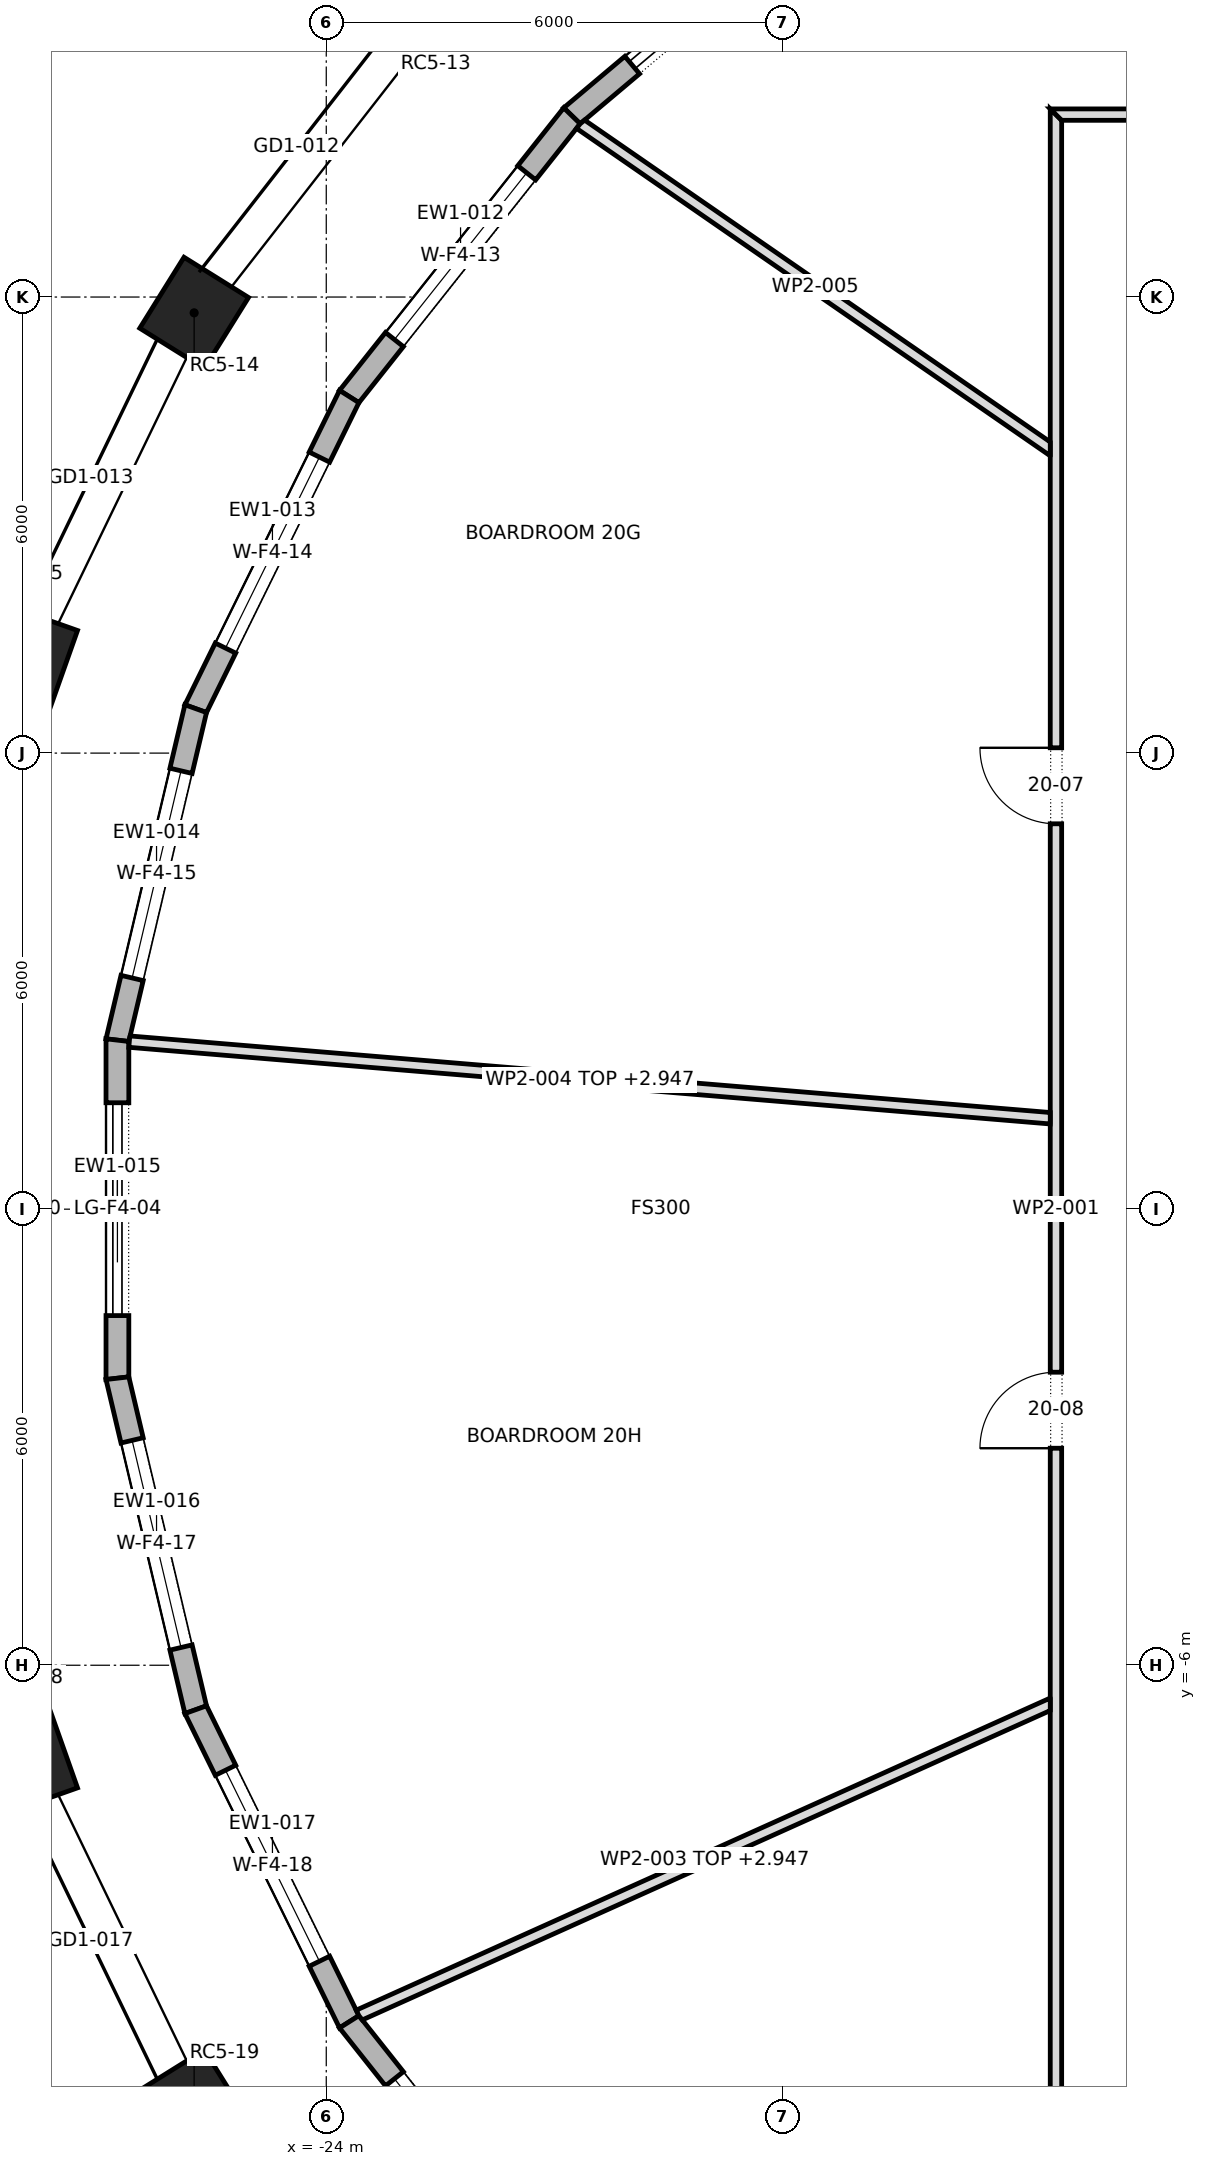
"""IFC4 building model, lengths in metres.
Left out: names, types, materials, properties, quantities, classifications, styles, units other than length and angle.
Written with IfcOpenShell. Run it as: python <this file> out.ifc"""

import sys

from ifc_helpers import new_model, si_unit, direction, frame, frame_2d, origin, origin_2d, place, context, subcontext, project, spatial, polyline, rectangle, outline, extrude, element, fill, save


model = new_model("IFC4")
c1 = context("Model", 3, precision=1e-05, world=origin(), true_north=direction((0.0, 1.0)))
c2 = subcontext(c1, "Body", "Model", "MODEL_VIEW")
j1 = project(units=[si_unit("LENGTHUNIT", "METRE"), si_unit("PLANEANGLEUNIT", "RADIAN")], contexts=[c1])
p1 = place(None, origin())
s1 = spatial("IfcSite", under=j1, at=p1, CompositionType="ELEMENT")
p2 = place(p1, origin())
s2 = spatial("IfcBuilding", under=s1, at=p2, CompositionType="ELEMENT")
p3 = place(p2, frame((0.0, 0.0, 288.3)))
s3 = spatial("IfcBuildingStorey", under=s2, at=p3, CompositionType="ELEMENT", Elevation=288.3)
for number, where, z_axis, x_axis in (
    (1, (-22.56, 15.869, 0.0), (0.0, 0.0, 1.0), (-0.692, -0.722, 0.0)),
    (2, (-25.738, 11.792, 0.0), (0.0, 0.0, 1.0), (-0.529, -0.849, 0.0)),
    (3, (-27.927, 7.261, 0.0), (0.0, 0.0, 1.0), (-0.334, -0.943, 0.0)),
    (4, (-27.927, -7.261, 0.0), (0.0, 0.0, 1.0), (0.334, -0.943, 0.0)),
    (5, (-25.738, -11.792, 0.0), (0.0, 0.0, 1.0), (0.529, -0.849, 0.0)),
):
    element("IfcColumn", number, at=place(p3, frame(where, z_axis=z_axis, x_axis=x_axis)), inside=s3, PredefinedType="COLUMN", context=c2, shape_type="SweptSolid", body=[
        extrude(rectangle(XDim=1.1, YDim=1.0, at=origin_2d()), origin(), (0.0, 0.0, 1.0), 4.0),
    ])
p4 = place(p3, frame((-17.041, 17.523, 0.0), z_axis=(0.0, 0.0, 1.0), x_axis=(-0.764876116592, -0.644177402792, 0.0)))
e6 = element("IfcWall", 6, at=p4, inside=s3, PredefinedType="STANDARD", context=c2, shape_type="SweptSolid", body=[
    extrude(outline(polyline([(-0.014, -0.15), (4.888, -0.15), (4.858, 0.15), (0.014, 0.15), (-0.014, -0.15)])), origin(), (0.0, 0.0, 1.0), 3.7),
])
p5 = place(p4, frame((1.036, 0.0, 0.0)))
e7 = element("IfcOpeningElement", 7, at=p5, cuts=e6, PredefinedType="OPENING", context=c2, shape_type="SweptSolid", body=[
    extrude(rectangle(XDim=2.8, YDim=3.25, at=frame_2d((1.4, 1.625))), frame((0.0, 0.162, 0.0), z_axis=(0.0, -1.0, 0.0), x_axis=(1.0, 0.0, 0.0)), (0.0, 0.0, 1.0), 0.324),
])
p6 = place(p3, frame((-20.768, 14.384, 0.0), z_axis=(0.0, 0.0, 1.0), x_axis=(-0.621544881236, -0.783378555112, 0.0)))
e8 = element("IfcWall", 8, at=p6, inside=s3, PredefinedType="STANDARD", context=c2, shape_type="SweptSolid", body=[
    extrude(outline(polyline([(-0.015, -0.15), (4.73, -0.15), (4.698, 0.15), (0.015, 0.15), (-0.015, -0.15)])), origin(), (0.0, 0.0, 1.0), 3.7),
])
p7 = place(p6, frame((0.957, 0.0, 0.6)))
e9 = element("IfcOpeningElement", 9, at=p7, cuts=e8, PredefinedType="OPENING", context=c2, shape_type="SweptSolid", body=[
    extrude(rectangle(XDim=2.8, YDim=2.65, at=frame_2d((1.4, 1.325))), frame((0.0, 0.162, 0.0), z_axis=(0.0, -1.0, 0.0), x_axis=(1.0, 0.0, 0.0)), (0.0, 0.0, 1.0), 0.324),
])
p8 = place(p3, frame((-23.698, 10.691, 0.0), z_axis=(0.0, 0.0, 1.0), x_axis=(-0.441335149795, -0.897342345794, 0.0)))
e10 = element("IfcWall", 10, at=p8, inside=s3, PredefinedType="STANDARD", context=c2, shape_type="SweptSolid", body=[
    extrude(outline(polyline([(-0.016, -0.15), (4.593, -0.15), (4.559, 0.15), (0.016, 0.15), (-0.016, -0.15)])), origin(), (0.0, 0.0, 1.0), 3.7),
])
p9 = place(p8, frame((0.888, 0.0, 0.6)))
e11 = element("IfcOpeningElement", 11, at=p9, cuts=e10, PredefinedType="OPENING", context=c2, shape_type="SweptSolid", body=[
    extrude(rectangle(XDim=2.8, YDim=2.65, at=frame_2d((1.4, 1.325))), frame((0.0, 0.162, 0.0), z_axis=(0.0, -1.0, 0.0), x_axis=(1.0, 0.0, 0.0)), (0.0, 0.0, 1.0), 0.324),
])
p10 = place(p3, frame((-25.718, 6.585, 0.0), z_axis=(0.0, 0.0, 1.0), x_axis=(-0.229862207503, -0.973223183839, 0.0)))
e12 = element("IfcWall", 12, at=p10, inside=s3, PredefinedType="STANDARD", context=c2, shape_type="SweptSolid", body=[
    extrude(outline(polyline([(-0.017, -0.15), (4.499, -0.15), (4.463, 0.15), (0.017, 0.15), (-0.017, -0.15)])), origin(), (0.0, 0.0, 1.0), 3.7),
])
p11 = place(p10, frame((0.841, 0.0, 0.6)))
e13 = element("IfcOpeningElement", 13, at=p11, cuts=e12, PredefinedType="OPENING", context=c2, shape_type="SweptSolid", body=[
    extrude(rectangle(XDim=2.8, YDim=2.65, at=frame_2d((1.4, 1.325))), frame((0.0, 0.162, 0.0), z_axis=(0.0, -1.0, 0.0), x_axis=(1.0, 0.0, 0.0)), (0.0, 0.0, 1.0), 0.324),
])
p12 = place(p3, frame((-26.748, 2.224, 0.0), z_axis=(0.0, 0.0, 1.0), x_axis=(0.0, -1.0, 0.0)))
e14 = element("IfcWall", 14, at=p12, inside=s3, PredefinedType="STANDARD", context=c2, shape_type="SweptSolid", body=[
    extrude(outline(polyline([(-0.018, -0.15), (4.465, -0.15), (4.43, 0.15), (0.018, 0.15), (-0.018, -0.15)])), origin(), (0.0, 0.0, 1.0), 3.7),
])
p13 = place(p12, frame((0.824, 0.0, 0.0)))
e15 = element("IfcOpeningElement", 15, at=p13, cuts=e14, PredefinedType="OPENING", context=c2, shape_type="SweptSolid", body=[
    extrude(rectangle(XDim=2.8, YDim=3.25, at=frame_2d((1.4, 1.625))), frame((0.0, 0.162, 0.0), z_axis=(0.0, -1.0, 0.0), x_axis=(1.0, 0.0, 0.0)), (0.0, 0.0, 1.0), 0.324),
])
p14 = place(p3, frame((-26.748, -2.224, 0.0), z_axis=(0.0, 0.0, 1.0), x_axis=(0.229862207503, -0.973223183839, 0.0)))
e16 = element("IfcWall", 16, at=p14, inside=s3, PredefinedType="STANDARD", context=c2, shape_type="SweptSolid", body=[
    extrude(outline(polyline([(-0.018, -0.15), (4.498, -0.15), (4.464, 0.15), (0.018, 0.15), (-0.018, -0.15)])), origin(), (0.0, 0.0, 1.0), 3.7),
])
p15 = place(p14, frame((0.841, 0.0, 0.6)))
e17 = element("IfcOpeningElement", 17, at=p15, cuts=e16, PredefinedType="OPENING", context=c2, shape_type="SweptSolid", body=[
    extrude(rectangle(XDim=2.8, YDim=2.65, at=frame_2d((1.4, 1.325))), frame((0.0, 0.162, 0.0), z_axis=(0.0, -1.0, 0.0), x_axis=(1.0, 0.0, 0.0)), (0.0, 0.0, 1.0), 0.324),
])
p16 = place(p3, frame((-25.718, -6.585, 0.0), z_axis=(0.0, 0.0, 1.0), x_axis=(0.441335149795, -0.897342345794, 0.0)))
e18 = element("IfcWall", 18, at=p16, inside=s3, PredefinedType="STANDARD", context=c2, shape_type="SweptSolid", body=[
    extrude(outline(polyline([(-0.017, -0.15), (4.592, -0.15), (4.56, 0.15), (0.017, 0.15), (-0.017, -0.15)])), origin(), (0.0, 0.0, 1.0), 3.7),
])
p17 = place(p16, frame((0.888, 0.0, 0.6)))
e19 = element("IfcOpeningElement", 19, at=p17, cuts=e18, PredefinedType="OPENING", context=c2, shape_type="SweptSolid", body=[
    extrude(rectangle(XDim=2.8, YDim=2.65, at=frame_2d((1.4, 1.325))), frame((0.0, 0.162, 0.0), z_axis=(0.0, -1.0, 0.0), x_axis=(1.0, 0.0, 0.0)), (0.0, 0.0, 1.0), 0.324),
])
p18 = place(p3, frame((-23.698, -10.691, 0.0), z_axis=(0.0, 0.0, 1.0), x_axis=(0.621544881236, -0.783378555112, 0.0)))
e20 = element("IfcWall", 20, at=p18, inside=s3, PredefinedType="STANDARD", context=c2, shape_type="SweptSolid", body=[
    extrude(outline(polyline([(-0.016, -0.15), (4.729, -0.15), (4.699, 0.15), (0.016, 0.15), (-0.016, -0.15)])), origin(), (0.0, 0.0, 1.0), 3.7),
])
p19 = place(p18, frame((0.957, 0.0, 0.6)))
e21 = element("IfcOpeningElement", 21, at=p19, cuts=e20, PredefinedType="OPENING", context=c2, shape_type="SweptSolid", body=[
    extrude(rectangle(XDim=2.8, YDim=2.65, at=frame_2d((1.4, 1.325))), frame((0.0, 0.162, 0.0), z_axis=(0.0, -1.0, 0.0), x_axis=(1.0, 0.0, 0.0)), (0.0, 0.0, 1.0), 0.324),
])
p20 = place(p3, frame((-14.4, -14.475, 0.0), z_axis=(0.0, 0.0, 1.0), x_axis=(0.0, 1.0, 0.0)))
e22 = element("IfcWall", 22, at=p20, inside=s3, PredefinedType="PARTITIONING", context=c2, shape_type="SweptSolid", body=[
    extrude(outline(polyline([(0.15, -0.075), (2.06, -0.075), (3.97, -0.075), (5.88, -0.075), (7.79, -0.075), (9.7, -0.075), (11.61, -0.075), (13.52, -0.075), (15.43, -0.075), (17.34, -0.075), (19.25, -0.075), (21.16, -0.075), (23.07, -0.075), (24.98, -0.075), (26.89, -0.075), (28.8, -0.075), (28.95, 0.075), (27.02, 0.075), (25.09, 0.075), (23.16, 0.075), (21.23, 0.075), (19.3, 0.075), (17.37, 0.075), (15.44, 0.075), (13.51, 0.075), (11.58, 0.075), (9.65, 0.075), (7.72, 0.075), (5.79, 0.075), (3.86, 0.075), (1.93, 0.075), (0.0, 0.075), (0.15, -0.075)])), origin(), (0.0, 0.0, 1.0), 3.7),
])
p21 = place(p20, frame((19.545, 0.0, 0.0)))
e23 = element("IfcOpeningElement", 23, at=p21, cuts=e22, PredefinedType="OPENING", context=c2, shape_type="SweptSolid", body=[
    extrude(rectangle(XDim=1.0, YDim=2.1, at=frame_2d((0.5, 1.05))), frame((0.0, 0.087, 0.0), z_axis=(0.0, -1.0, 0.0), x_axis=(1.0, 0.0, 0.0)), (0.0, 0.0, 1.0), 0.174),
])
p22 = place(p20, frame((11.33, 0.0, 0.0)))
e24 = element("IfcOpeningElement", 24, at=p22, cuts=e22, PredefinedType="OPENING", context=c2, shape_type="SweptSolid", body=[
    extrude(rectangle(XDim=1.0, YDim=2.1, at=frame_2d((0.5, 1.05))), frame((0.0, 0.087, 0.0), z_axis=(0.0, -1.0, 0.0), x_axis=(1.0, 0.0, 0.0)), (0.0, 0.0, 1.0), 0.174),
])
p23 = place(p3, frame((-14.445, -6.5, 0.0), z_axis=(0.0, 0.0, 1.0), x_axis=(-0.912008635086, -0.410171000351, 0.0)))
e25 = element("IfcWall", 25, at=p23, inside=s3, PredefinedType="PARTITIONING", context=c2, shape_type="SweptSolid", body=[
    extrude(outline(polyline([(10.011, -0.075), (10.011, -0.071), (10.009, 0.005), (9.991, 0.075), (8.006, 0.075), (6.021, 0.075), (4.037, 0.075), (2.052, 0.075), (0.067, 0.075), (0.0, -0.074), (0.0, -0.075), (1.668, -0.075), (3.337, -0.075), (5.006, -0.075), (6.674, -0.075), (8.343, -0.075), (10.011, -0.075)])), origin(), (0.0, 0.0, 1.0), 2.947),
])
p24 = place(p3, frame((-14.469, 1.196, 0.0), z_axis=(0.0, 0.0, 1.0), x_axis=(-0.996556684965, 0.08291425481, 0.0)))
e26 = element("IfcWall", 26, at=p24, inside=s3, PredefinedType="PARTITIONING", context=c2, shape_type="SweptSolid", body=[
    extrude(outline(polyline([(0.012, -0.075), (1.747, -0.075), (3.483, -0.075), (5.218, -0.075), (6.953, -0.075), (8.689, -0.075), (10.424, -0.075), (12.159, -0.075), (12.164, -0.045), (12.164, 0.075), (10.426, 0.075), (8.688, 0.075), (6.951, 0.075), (5.213, 0.075), (3.475, 0.075), (1.738, 0.075), (0.0, 0.075), (0.0, 0.07), (0.012, -0.075)])), origin(), (0.0, 0.0, 1.0), 2.947),
])
p25 = place(p3, frame((-14.433, 9.972, 0.0), z_axis=(0.0, 0.0, 1.0), x_axis=(-0.822596869136, 0.568625000231, 0.0)))
e27 = element("IfcWall", 27, at=p25, inside=s3, PredefinedType="PARTITIONING", context=c2, shape_type="SweptSolid", body=[
    extrude(outline(polyline([(0.103, -0.075), (1.965, -0.075), (3.827, -0.075), (5.689, -0.075), (7.551, -0.075), (7.571, -0.002), (7.576, 0.069), (7.576, 0.075), (5.682, 0.075), (3.788, 0.075), (1.894, 0.075), (0.0, 0.075), (0.0, 0.074), (0.103, -0.075)])), origin(), (0.0, 0.0, 1.0), 3.7),
])
p26 = place(p3, frame((-14.475, 14.4, 0.0), z_axis=(0.0, 0.0, 1.0), x_axis=(1.0, 0.0, 0.0)))
e28 = element("IfcWall", 28, at=p26, inside=s3, PredefinedType="PARTITIONING", context=c2, shape_type="SweptSolid", body=[
    extrude(outline(polyline([(0.15, -0.075), (2.06, -0.075), (3.97, -0.075), (5.88, -0.075), (7.79, -0.075), (9.7, -0.075), (11.61, -0.075), (13.52, -0.075), (15.43, -0.075), (17.34, -0.075), (19.25, -0.075), (21.16, -0.075), (23.07, -0.075), (24.98, -0.075), (26.89, -0.075), (28.8, -0.075), (28.95, 0.075), (27.02, 0.075), (25.09, 0.075), (23.16, 0.075), (21.23, 0.075), (19.3, 0.075), (17.37, 0.075), (15.44, 0.075), (13.51, 0.075), (11.58, 0.075), (9.65, 0.075), (7.72, 0.075), (5.79, 0.075), (3.86, 0.075), (1.93, 0.075), (0.0, 0.075), (0.15, -0.075)])), origin(), (0.0, 0.0, 1.0), 3.7),
])
p27 = place(p26, frame((20.15, 0.0, 0.0)))
e29 = element("IfcOpeningElement", 29, at=p27, cuts=e28, PredefinedType="OPENING", context=c2, shape_type="SweptSolid", body=[
    extrude(rectangle(XDim=1.0, YDim=2.1, at=frame_2d((0.5, 1.05))), frame((0.0, 0.087, 0.0), z_axis=(0.0, -1.0, 0.0), x_axis=(1.0, 0.0, 0.0)), (0.0, 0.0, 1.0), 0.174),
])
p28 = place(p26, frame((8.565, 0.0, 0.0)))
e30 = element("IfcOpeningElement", 30, at=p28, cuts=e28, PredefinedType="OPENING", context=c2, shape_type="SweptSolid", body=[
    extrude(rectangle(XDim=1.0, YDim=2.1, at=frame_2d((0.5, 1.05))), frame((0.0, 0.087, 0.0), z_axis=(0.0, -1.0, 0.0), x_axis=(1.0, 0.0, 0.0)), (0.0, 0.0, 1.0), 0.174),
])
p29 = place(p26, frame((2.205, 0.0, 0.0)))
e31 = element("IfcOpeningElement", 31, at=p29, cuts=e28, PredefinedType="OPENING", context=c2, shape_type="SweptSolid", body=[
    extrude(rectangle(XDim=1.0, YDim=2.1, at=frame_2d((0.5, 1.05))), frame((0.0, 0.087, 0.0), z_axis=(0.0, -1.0, 0.0), x_axis=(1.0, 0.0, 0.0)), (0.0, 0.0, 1.0), 0.174),
])
p30 = place(p5, origin())
e32 = element("IfcDoor", 32, at=p30, inside=s3, OperationType="DOUBLE_DOOR_SLIDING", PredefinedType="DOOR", context=c2, shape_type="SweptSolid", body=[
    extrude(rectangle(XDim=2.8, YDim=3.25, at=frame_2d((1.4, 1.625))), frame((0.0, 0.025, 0.0), z_axis=(0.0, -1.0, 0.0), x_axis=(1.0, 0.0, 0.0)), (0.0, 0.0, 1.0), 0.05),
])
fill(e7, e32)
p31 = place(p7, origin())
e33 = element("IfcWindow", 33, at=p31, inside=s3, PartitioningType="DOUBLE_PANEL_VERTICAL", PredefinedType="WINDOW", context=c2, shape_type="SweptSolid", body=[
    extrude(rectangle(XDim=2.8, YDim=2.65, at=frame_2d((1.4, 1.325))), frame((0.0, 0.03, 0.0), z_axis=(0.0, -1.0, 0.0), x_axis=(1.0, 0.0, 0.0)), (0.0, 0.0, 1.0), 0.06),
])
fill(e9, e33)
p32 = place(p9, origin())
e34 = element("IfcWindow", 34, at=p32, inside=s3, PartitioningType="DOUBLE_PANEL_VERTICAL", PredefinedType="WINDOW", context=c2, shape_type="SweptSolid", body=[
    extrude(rectangle(XDim=2.8, YDim=2.65, at=frame_2d((1.4, 1.325))), frame((0.0, 0.03, 0.0), z_axis=(0.0, -1.0, 0.0), x_axis=(1.0, 0.0, 0.0)), (0.0, 0.0, 1.0), 0.06),
])
fill(e11, e34)
p33 = place(p11, origin())
e35 = element("IfcWindow", 35, at=p33, inside=s3, PartitioningType="DOUBLE_PANEL_VERTICAL", PredefinedType="WINDOW", context=c2, shape_type="SweptSolid", body=[
    extrude(rectangle(XDim=2.8, YDim=2.65, at=frame_2d((1.4, 1.325))), frame((0.0, 0.03, 0.0), z_axis=(0.0, -1.0, 0.0), x_axis=(1.0, 0.0, 0.0)), (0.0, 0.0, 1.0), 0.06),
])
fill(e13, e35)
p34 = place(p13, origin())
e36 = element("IfcDoor", 36, at=p34, inside=s3, OperationType="DOUBLE_DOOR_SLIDING", PredefinedType="DOOR", context=c2, shape_type="SweptSolid", body=[
    extrude(rectangle(XDim=2.8, YDim=3.25, at=frame_2d((1.4, 1.625))), frame((0.0, 0.025, 0.0), z_axis=(0.0, -1.0, 0.0), x_axis=(1.0, 0.0, 0.0)), (0.0, 0.0, 1.0), 0.05),
])
fill(e15, e36)
p35 = place(p15, origin())
e37 = element("IfcWindow", 37, at=p35, inside=s3, PartitioningType="DOUBLE_PANEL_VERTICAL", PredefinedType="WINDOW", context=c2, shape_type="SweptSolid", body=[
    extrude(rectangle(XDim=2.8, YDim=2.65, at=frame_2d((1.4, 1.325))), frame((0.0, 0.03, 0.0), z_axis=(0.0, -1.0, 0.0), x_axis=(1.0, 0.0, 0.0)), (0.0, 0.0, 1.0), 0.06),
])
fill(e17, e37)
p36 = place(p17, origin())
e38 = element("IfcWindow", 38, at=p36, inside=s3, PartitioningType="DOUBLE_PANEL_VERTICAL", PredefinedType="WINDOW", context=c2, shape_type="SweptSolid", body=[
    extrude(rectangle(XDim=2.8, YDim=2.65, at=frame_2d((1.4, 1.325))), frame((0.0, 0.03, 0.0), z_axis=(0.0, -1.0, 0.0), x_axis=(1.0, 0.0, 0.0)), (0.0, 0.0, 1.0), 0.06),
])
fill(e19, e38)
p37 = place(p19, origin())
e39 = element("IfcWindow", 39, at=p37, inside=s3, PartitioningType="DOUBLE_PANEL_VERTICAL", PredefinedType="WINDOW", context=c2, shape_type="SweptSolid", body=[
    extrude(rectangle(XDim=2.8, YDim=2.65, at=frame_2d((1.4, 1.325))), frame((0.0, 0.03, 0.0), z_axis=(0.0, -1.0, 0.0), x_axis=(1.0, 0.0, 0.0)), (0.0, 0.0, 1.0), 0.06),
])
fill(e21, e39)
p38 = place(p21, origin())
e40 = element("IfcDoor", 40, at=p38, inside=s3, OperationType="SINGLE_SWING_LEFT", PredefinedType="DOOR", context=c2, shape_type="SweptSolid", body=[
    extrude(rectangle(XDim=1.0, YDim=2.1, at=frame_2d((0.5, 1.05))), frame((0.0, 0.025, 0.0), z_axis=(0.0, -1.0, 0.0), x_axis=(1.0, 0.0, 0.0)), (0.0, 0.0, 1.0), 0.05),
])
fill(e23, e40)
p39 = place(p22, origin())
e41 = element("IfcDoor", 41, at=p39, inside=s3, OperationType="SINGLE_SWING_RIGHT", PredefinedType="DOOR", context=c2, shape_type="SweptSolid", body=[
    extrude(rectangle(XDim=1.0, YDim=2.1, at=frame_2d((0.5, 1.05))), frame((0.0, 0.025, 0.0), z_axis=(0.0, -1.0, 0.0), x_axis=(1.0, 0.0, 0.0)), (0.0, 0.0, 1.0), 0.05),
])
fill(e24, e41)
save(model, sys.argv[1])
